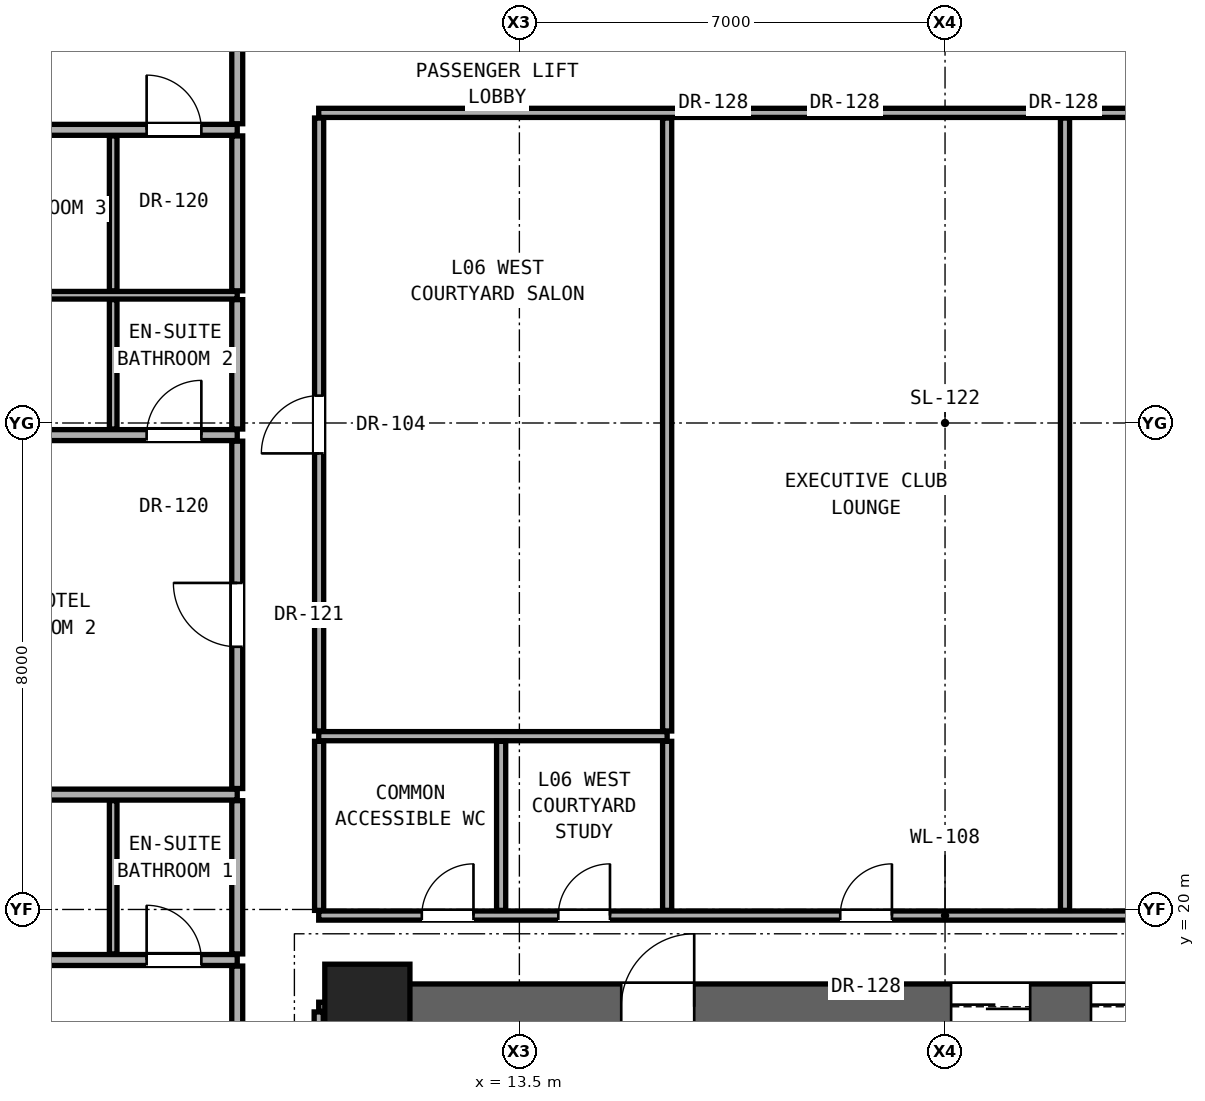
"""IFC4 building model, lengths in metres.
Left out: names, types, materials, properties, quantities, classifications, styles, units other than length and angle.
Written with IfcOpenShell. Run it as: python <this file> out.ifc"""

import sys

from ifc_helpers import new_model, si_unit, direction, frame, frame_2d, origin, origin_2d, place, context, subcontext, project, spatial, rectangle, extrude, element, fill, save


model = new_model("IFC4")
c1 = context("Model", 3, precision=1e-05, world=origin(), true_north=direction((0.0, 1.0)))
c2 = subcontext(c1, "Body", "Model", "MODEL_VIEW")
j1 = project(units=[si_unit("LENGTHUNIT", "METRE"), si_unit("PLANEANGLEUNIT", "RADIAN")], contexts=[c1])
p1 = place(None, origin())
s1 = spatial("IfcSite", under=j1, at=p1, CompositionType="ELEMENT")
p2 = place(p1, origin())
s2 = spatial("IfcBuilding", under=s1, at=p2, CompositionType="ELEMENT")
p3 = place(p2, frame((0.0, 0.0, 25.7)))
s3 = spatial("IfcBuildingStorey", under=s2, at=p3, CompositionType="ELEMENT", Elevation=25.7)
p4 = place(p3, frame((11.0, 18.4, 0.0), z_axis=(0.0, 0.0, 1.0), x_axis=(1.0, 0.0, 0.0)))
e1 = element("IfcColumn", 1, at=p4, inside=s3, PredefinedType="COLUMN", context=c2, shape_type="SweptSolid", body=[
    extrude(rectangle(XDim=1.4, YDim=1.4, at=origin_2d()), origin(), (0.0, 0.0, 1.0), 3.3),
])
p5 = place(p3, frame((11.0, 12.4, 0.0), z_axis=(0.0, 0.0, 1.0), x_axis=(0.0, 1.0, 0.0)))
e2 = element("IfcWall", 2, at=p5, inside=s3, PredefinedType="SHEAR", context=c2, shape_type="SweptSolid", body=[
    extrude(rectangle(XDim=6.0, YDim=0.75, at=frame_2d((3.0, 0.0))), origin(), (0.0, 0.0, 1.0), 3.06),
])
p6 = place(p3, frame((11.0, 18.4, 0.0), z_axis=(0.0, 0.0, 1.0), x_axis=(1.0, 0.0, 0.0)))
e3 = element("IfcWall", 3, at=p6, inside=s3, PredefinedType="SHEAR", context=c2, shape_type="SweptSolid", body=[
    extrude(rectangle(XDim=19.0, YDim=0.75, at=frame_2d((9.5, 0.0))), origin(), (0.0, 0.0, 1.0), 3.06),
])
p7 = place(p6, frame((4.175, 0.0, 0.0)))
e4 = element("IfcOpeningElement", 4, at=p7, cuts=e3, PredefinedType="OPENING", context=c2, shape_type="SweptSolid", body=[
    extrude(rectangle(XDim=1.2, YDim=2.25, at=frame_2d((0.6, 1.125))), frame((0.0, 0.385, 0.0), z_axis=(0.0, -1.0, 0.0), x_axis=(1.0, 0.0, 0.0)), (0.0, 0.0, 1.0), 0.77),
])
p8 = place(p6, frame((9.6, 0.0, 0.0)))
e5 = element("IfcOpeningElement", 5, at=p8, cuts=e3, PredefinedType="OPENING", context=c2, shape_type="SweptSolid", body=[
    extrude(rectangle(XDim=1.3, YDim=2.3, at=frame_2d((0.65, 1.15))), frame((0.0, 0.385, 0.0), z_axis=(0.0, -1.0, 0.0), x_axis=(1.0, 0.0, 0.0)), (0.0, 0.0, 1.0), 0.77),
])
p9 = place(p6, frame((11.9, 0.0, 0.0)))
e6 = element("IfcOpeningElement", 6, at=p9, cuts=e3, PredefinedType="OPENING", context=c2, shape_type="SweptSolid", body=[
    extrude(rectangle(XDim=1.3, YDim=2.3, at=frame_2d((0.65, 1.15))), frame((0.0, 0.385, 0.0), z_axis=(0.0, -1.0, 0.0), x_axis=(1.0, 0.0, 0.0)), (0.0, 0.0, 1.0), 0.77),
])
p10 = place(p6, frame((14.3, 0.0, 0.0)))
e7 = element("IfcOpeningElement", 7, at=p10, cuts=e3, PredefinedType="OPENING", context=c2, shape_type="SweptSolid", body=[
    extrude(rectangle(XDim=1.3, YDim=2.3, at=frame_2d((0.65, 1.15))), frame((0.0, 0.385, 0.0), z_axis=(0.0, -1.0, 0.0), x_axis=(1.0, 0.0, 0.0)), (0.0, 0.0, 1.0), 0.77),
])
p11 = place(p6, frame((16.6, 0.0, 0.0)))
e8 = element("IfcOpeningElement", 8, at=p11, cuts=e3, PredefinedType="OPENING", context=c2, shape_type="SweptSolid", body=[
    extrude(rectangle(XDim=1.3, YDim=2.3, at=frame_2d((0.65, 1.15))), frame((0.0, 0.385, 0.0), z_axis=(0.0, -1.0, 0.0), x_axis=(1.0, 0.0, 0.0)), (0.0, 0.0, 1.0), 0.77),
])
p12 = place(p3, frame((10.2, 18.4, 0.0), z_axis=(0.0, 0.0, 1.0), x_axis=(1.0, 0.0, 0.0)))
e9 = element("IfcWall", 9, at=p12, inside=s3, PredefinedType="PARTITIONING", context=c2, shape_type="SweptSolid", body=[
    extrude(rectangle(XDim=0.43, YDim=0.15, at=frame_2d((0.215, 0.0))), origin(), (0.0, 0.0, 1.0), 2.436),
])
p13 = place(p3, frame((-0.76, 19.169, 0.0), z_axis=(0.0, 0.0, 1.0), x_axis=(1.0, 0.0, 0.0)))
e10 = element("IfcWall", 10, at=p13, inside=s3, PredefinedType="PARTITIONING", context=c2, shape_type="SweptSolid", body=[
    extrude(rectangle(XDim=9.62, YDim=0.18, at=frame_2d((4.81, 0.0))), origin(), (0.0, 0.0, 1.0), 2.125),
])
p14 = place(p13, frame((3.685, 0.0, 0.0)))
e11 = element("IfcOpeningElement", 11, at=p14, cuts=e10, PredefinedType="OPENING", context=c2, shape_type="SweptSolid", body=[
    extrude(rectangle(XDim=0.85, YDim=2.01, at=frame_2d((0.425, 1.005))), frame((0.0, 0.1, 0.0), z_axis=(0.0, -1.0, 0.0), x_axis=(1.0, 0.0, 0.0)), (0.0, 0.0, 1.0), 0.2),
])
p15 = place(p13, frame((8.13, 0.0, 0.0)))
e12 = element("IfcOpeningElement", 12, at=p15, cuts=e10, PredefinedType="OPENING", context=c2, shape_type="SweptSolid", body=[
    extrude(rectangle(XDim=0.9, YDim=2.1, at=frame_2d((0.45, 1.05))), frame((0.0, 0.1, 0.0), z_axis=(0.0, -1.0, 0.0), x_axis=(1.0, 0.0, 0.0)), (0.0, 0.0, 1.0), 0.2),
])
p16 = place(p3, frame((10.2, 19.9, 0.0), z_axis=(0.0, 0.0, 1.0), x_axis=(1.0, 0.0, 0.0)))
e13 = element("IfcWall", 13, at=p16, inside=s3, PredefinedType="PARTITIONING", context=c2, shape_type="SweptSolid", body=[
    extrude(rectangle(XDim=20.6, YDim=0.15, at=frame_2d((10.3, 0.0))), origin(), (0.0, 0.0, 1.0), 2.104),
])
p17 = place(p16, frame((1.695, 0.0, 0.0)))
e14 = element("IfcOpeningElement", 14, at=p17, cuts=e13, PredefinedType="OPENING", context=c2, shape_type="SweptSolid", body=[
    extrude(rectangle(XDim=0.85, YDim=2.01, at=frame_2d((0.425, 1.005))), frame((0.0, 0.085, 0.0), z_axis=(0.0, -1.0, 0.0), x_axis=(1.0, 0.0, 0.0)), (0.0, 0.0, 1.0), 0.17),
])
p18 = place(p16, frame((3.94, 0.0, 0.0)))
e15 = element("IfcOpeningElement", 15, at=p18, cuts=e13, PredefinedType="OPENING", context=c2, shape_type="SweptSolid", body=[
    extrude(rectangle(XDim=0.85, YDim=2.01, at=frame_2d((0.425, 1.005))), frame((0.0, 0.085, 0.0), z_axis=(0.0, -1.0, 0.0), x_axis=(1.0, 0.0, 0.0)), (0.0, 0.0, 1.0), 0.17),
])
p19 = place(p16, frame((8.576, 0.0, 0.0)))
e16 = element("IfcOpeningElement", 16, at=p19, cuts=e13, PredefinedType="OPENING", context=c2, shape_type="SweptSolid", body=[
    extrude(rectangle(XDim=0.85, YDim=2.01, at=frame_2d((0.425, 1.005))), frame((0.0, 0.085, 0.0), z_axis=(0.0, -1.0, 0.0), x_axis=(1.0, 0.0, 0.0)), (0.0, 0.0, 1.0), 0.17),
])
p20 = place(p3, frame((-0.76, 21.889, 0.0), z_axis=(0.0, 0.0, 1.0), x_axis=(1.0, 0.0, 0.0)))
e17 = element("IfcWall", 17, at=p20, inside=s3, PredefinedType="PARTITIONING", context=c2, shape_type="SweptSolid", body=[
    extrude(rectangle(XDim=9.62, YDim=0.18, at=frame_2d((4.81, 0.0))), origin(), (0.0, 0.0, 1.0), 2.125),
])
p21 = place(p3, frame((10.2, 22.85, 0.0), z_axis=(0.0, 0.0, 1.0), x_axis=(1.0, 0.0, 0.0)))
e18 = element("IfcWall", 18, at=p21, inside=s3, PredefinedType="PARTITIONING", context=c2, shape_type="SweptSolid", body=[
    extrude(rectangle(XDim=5.73, YDim=0.15, at=frame_2d((2.865, 0.0))), origin(), (0.0, 0.0, 1.0), 2.104),
])
p22 = place(p3, frame((-0.76, 27.801, 0.0), z_axis=(0.0, 0.0, 1.0), x_axis=(1.0, 0.0, 0.0)))
e19 = element("IfcWall", 19, at=p22, inside=s3, PredefinedType="PARTITIONING", context=c2, shape_type="SweptSolid", body=[
    extrude(rectangle(XDim=9.62, YDim=0.18, at=frame_2d((4.81, 0.0))), origin(), (0.0, 0.0, 1.0), 2.125),
])
p23 = place(p22, frame((3.385, 0.0, 0.0)))
e20 = element("IfcOpeningElement", 20, at=p23, cuts=e19, PredefinedType="OPENING", context=c2, shape_type="SweptSolid", body=[
    extrude(rectangle(XDim=0.85, YDim=2.01, at=frame_2d((0.425, 1.005))), frame((0.0, 0.1, 0.0), z_axis=(0.0, -1.0, 0.0), x_axis=(1.0, 0.0, 0.0)), (0.0, 0.0, 1.0), 0.2),
])
p24 = place(p22, frame((8.13, 0.0, 0.0)))
e21 = element("IfcOpeningElement", 21, at=p24, cuts=e19, PredefinedType="OPENING", context=c2, shape_type="SweptSolid", body=[
    extrude(rectangle(XDim=0.9, YDim=2.1, at=frame_2d((0.45, 1.05))), frame((0.0, 0.1, 0.0), z_axis=(0.0, -1.0, 0.0), x_axis=(1.0, 0.0, 0.0)), (0.0, 0.0, 1.0), 0.2),
])
p25 = place(p3, frame((-0.76, 30.101, 0.0), z_axis=(0.0, 0.0, 1.0), x_axis=(1.0, 0.0, 0.0)))
e22 = element("IfcWall", 22, at=p25, inside=s3, PredefinedType="PARTITIONING", context=c2, shape_type="SweptSolid", body=[
    extrude(rectangle(XDim=9.62, YDim=0.125, at=frame_2d((4.81, 0.0))), origin(), (0.0, 0.0, 1.0), 2.125),
])
p26 = place(p3, frame((-0.76, 32.821, 0.0), z_axis=(0.0, 0.0, 1.0), x_axis=(1.0, 0.0, 0.0)))
e23 = element("IfcWall", 23, at=p26, inside=s3, PredefinedType="PARTITIONING", context=c2, shape_type="SweptSolid", body=[
    extrude(rectangle(XDim=9.62, YDim=0.18, at=frame_2d((4.81, 0.0))), origin(), (0.0, 0.0, 1.0), 2.125),
])
p27 = place(p26, frame((3.685, 0.0, 0.0)))
e24 = element("IfcOpeningElement", 24, at=p27, cuts=e23, PredefinedType="OPENING", context=c2, shape_type="SweptSolid", body=[
    extrude(rectangle(XDim=0.85, YDim=2.01, at=frame_2d((0.425, 1.005))), frame((0.0, 0.1, 0.0), z_axis=(0.0, -1.0, 0.0), x_axis=(1.0, 0.0, 0.0)), (0.0, 0.0, 1.0), 0.2),
])
p28 = place(p26, frame((8.13, 0.0, 0.0)))
e25 = element("IfcOpeningElement", 25, at=p28, cuts=e23, PredefinedType="OPENING", context=c2, shape_type="SweptSolid", body=[
    extrude(rectangle(XDim=0.9, YDim=2.1, at=frame_2d((0.45, 1.05))), frame((0.0, 0.1, 0.0), z_axis=(0.0, -1.0, 0.0), x_axis=(1.0, 0.0, 0.0)), (0.0, 0.0, 1.0), 0.2),
])
p29 = place(p3, frame((10.2, 33.1, 0.0), z_axis=(0.0, 0.0, 1.0), x_axis=(1.0, 0.0, 0.0)))
e26 = element("IfcWall", 26, at=p29, inside=s3, PredefinedType="PARTITIONING", context=c2, shape_type="SweptSolid", body=[
    extrude(rectangle(XDim=20.6, YDim=0.15, at=frame_2d((10.3, 0.0))), origin(), (0.0, 0.0, 1.0), 2.104),
])
p30 = place(p29, frame((15.991, 0.0, 0.0)))
e27 = element("IfcOpeningElement", 27, at=p30, cuts=e26, PredefinedType="OPENING", context=c2, shape_type="SweptSolid", body=[
    extrude(rectangle(XDim=0.85, YDim=2.01, at=frame_2d((0.425, 1.005))), frame((0.0, 0.085, 0.0), z_axis=(0.0, -1.0, 0.0), x_axis=(1.0, 0.0, 0.0)), (0.0, 0.0, 1.0), 0.17),
])
p31 = place(p3, frame((6.82, 19.269, 0.0), z_axis=(0.0, 0.0, 1.0), x_axis=(0.0, 1.0, 0.0)))
e28 = element("IfcWall", 28, at=p31, inside=s3, PredefinedType="PARTITIONING", context=c2, shape_type="SweptSolid", body=[
    extrude(rectangle(XDim=2.52, YDim=0.125, at=frame_2d((1.26, 0.0))), origin(), (0.0, 0.0, 1.0), 3.06),
])
p32 = place(p3, frame((6.82, 27.901, 0.0), z_axis=(0.0, 0.0, 1.0), x_axis=(0.0, 1.0, 0.0)))
e29 = element("IfcWall", 29, at=p32, inside=s3, PredefinedType="PARTITIONING", context=c2, shape_type="SweptSolid", body=[
    extrude(rectangle(XDim=2.128, YDim=0.125, at=frame_2d((1.064, 0.0))), origin(), (0.0, 0.0, 1.0), 3.06),
])
p33 = place(p3, frame((6.82, 30.174, 0.0), z_axis=(0.0, 0.0, 1.0), x_axis=(0.0, 1.0, 0.0)))
e30 = element("IfcWall", 30, at=p33, inside=s3, PredefinedType="PARTITIONING", context=c2, shape_type="SweptSolid", body=[
    extrude(rectangle(XDim=2.547, YDim=0.125, at=frame_2d((1.274, 0.0))), origin(), (0.0, 0.0, 1.0), 2.279),
])
p34 = place(p3, frame((8.86, 14.402, 0.0), z_axis=(0.0, 0.0, 1.0), x_axis=(0.0, 1.0, 0.0)))
e31 = element("IfcWall", 31, at=p34, inside=s3, PredefinedType="PARTITIONING", context=c2, shape_type="SweptSolid", body=[
    extrude(rectangle(XDim=4.667, YDim=0.18, at=frame_2d((2.333, 0.0))), origin(), (0.0, 0.0, 1.0), 2.436),
])
p35 = place(p34, frame((2.408, 0.0, 0.0)))
e32 = element("IfcOpeningElement", 32, at=p35, cuts=e31, PredefinedType="OPENING", context=c2, shape_type="SweptSolid", body=[
    extrude(rectangle(XDim=1.05, YDim=2.2, at=frame_2d((0.525, 1.1))), frame((0.0, 0.1, 0.0), z_axis=(0.0, -1.0, 0.0), x_axis=(1.0, 0.0, 0.0)), (0.0, 0.0, 1.0), 0.2),
])
p36 = place(p3, frame((8.86, 19.269, 0.0), z_axis=(0.0, 0.0, 1.0), x_axis=(0.0, 1.0, 0.0)))
e33 = element("IfcWall", 33, at=p36, inside=s3, PredefinedType="PARTITIONING", context=c2, shape_type="SweptSolid", body=[
    extrude(rectangle(XDim=2.52, YDim=0.18, at=frame_2d((1.26, 0.0))), origin(), (0.0, 0.0, 1.0), 3.06),
])
p37 = place(p3, frame((8.86, 21.989, 0.0), z_axis=(0.0, 0.0, 1.0), x_axis=(0.0, 1.0, 0.0)))
e34 = element("IfcWall", 34, at=p37, inside=s3, PredefinedType="PARTITIONING", context=c2, shape_type="SweptSolid", body=[
    extrude(rectangle(XDim=5.712, YDim=0.18, at=frame_2d((2.856, 0.0))), origin(), (0.0, 0.0, 1.0), 2.279),
])
p38 = place(p37, frame((2.331, 0.0, 0.0)))
e35 = element("IfcOpeningElement", 35, at=p38, cuts=e34, PredefinedType="OPENING", context=c2, shape_type="SweptSolid", body=[
    extrude(rectangle(XDim=1.05, YDim=2.2, at=frame_2d((0.525, 1.1))), frame((0.0, 0.1, 0.0), z_axis=(0.0, -1.0, 0.0), x_axis=(1.0, 0.0, 0.0)), (0.0, 0.0, 1.0), 0.2),
])
p39 = place(p3, frame((8.86, 27.901, 0.0), z_axis=(0.0, 0.0, 1.0), x_axis=(0.0, 1.0, 0.0)))
e36 = element("IfcWall", 36, at=p39, inside=s3, PredefinedType="PARTITIONING", context=c2, shape_type="SweptSolid", body=[
    extrude(rectangle(XDim=2.128, YDim=0.18, at=frame_2d((1.064, 0.0))), origin(), (0.0, 0.0, 1.0), 3.06),
])
p40 = place(p3, frame((8.86, 30.174, 0.0), z_axis=(0.0, 0.0, 1.0), x_axis=(0.0, 1.0, 0.0)))
e37 = element("IfcWall", 37, at=p40, inside=s3, PredefinedType="PARTITIONING", context=c2, shape_type="SweptSolid", body=[
    extrude(rectangle(XDim=2.547, YDim=0.18, at=frame_2d((1.274, 0.0))), origin(), (0.0, 0.0, 1.0), 2.279),
])
p41 = place(p3, frame((8.86, 32.921, 0.0), z_axis=(0.0, 0.0, 1.0), x_axis=(0.0, 1.0, 0.0)))
e38 = element("IfcWall", 38, at=p41, inside=s3, PredefinedType="PARTITIONING", context=c2, shape_type="SweptSolid", body=[
    extrude(rectangle(XDim=8.677, YDim=0.18, at=frame_2d((4.338, 0.0))), origin(), (0.0, 0.0, 1.0), 2.436),
])
p42 = place(p41, frame((3.813, 0.0, 0.0)))
e39 = element("IfcOpeningElement", 39, at=p42, cuts=e38, PredefinedType="OPENING", context=c2, shape_type="SweptSolid", body=[
    extrude(rectangle(XDim=1.05, YDim=2.2, at=frame_2d((0.525, 1.1))), frame((0.0, 0.1, 0.0), z_axis=(0.0, -1.0, 0.0), x_axis=(1.0, 0.0, 0.0)), (0.0, 0.0, 1.0), 0.2),
])
p43 = place(p3, frame((10.2, 12.335, 0.0), z_axis=(0.0, 0.0, 1.0), x_axis=(0.0, 1.0, 0.0)))
e40 = element("IfcWall", 40, at=p43, inside=s3, PredefinedType="PARTITIONING", context=c2, shape_type="SweptSolid", body=[
    extrude(rectangle(XDim=5.98, YDim=0.15, at=frame_2d((2.99, 0.0))), origin(), (0.0, 0.0, 1.0), 2.436),
])
p44 = place(p3, frame((10.207, 19.985, 0.0), z_axis=(0.0, 0.0, 1.0), x_axis=(0.0, 1.0, 0.0)))
e41 = element("IfcWall", 41, at=p44, inside=s3, PredefinedType="PARTITIONING", context=c2, shape_type="SweptSolid", body=[
    extrude(rectangle(XDim=2.78, YDim=0.15, at=frame_2d((1.39, 0.0))), origin(), (0.0, 0.0, 1.0), 3.06),
])
p45 = place(p3, frame((10.207, 22.935, 0.0), z_axis=(0.0, 0.0, 1.0), x_axis=(0.0, 1.0, 0.0)))
e42 = element("IfcWall", 42, at=p45, inside=s3, PredefinedType="PARTITIONING", context=c2, shape_type="SweptSolid", body=[
    extrude(rectangle(XDim=10.08, YDim=0.15, at=frame_2d((5.04, 0.0))), origin(), (0.0, 0.0, 1.0), 2.279),
])
p46 = place(p45, frame((4.565, 0.0, 0.0)))
e43 = element("IfcOpeningElement", 43, at=p46, cuts=e42, PredefinedType="OPENING", context=c2, shape_type="SweptSolid", body=[
    extrude(rectangle(XDim=0.95, YDim=2.15, at=frame_2d((0.475, 1.075))), frame((0.0, 0.085, 0.0), z_axis=(0.0, -1.0, 0.0), x_axis=(1.0, 0.0, 0.0)), (0.0, 0.0, 1.0), 0.17),
])
p47 = place(p3, frame((13.2, 19.985, 0.0), z_axis=(0.0, 0.0, 1.0), x_axis=(0.0, 1.0, 0.0)))
e44 = element("IfcWall", 44, at=p47, inside=s3, PredefinedType="PARTITIONING", context=c2, shape_type="SweptSolid", body=[
    extrude(rectangle(XDim=2.78, YDim=0.15, at=frame_2d((1.39, 0.0))), origin(), (0.0, 0.0, 1.0), 3.06),
])
p48 = place(p3, frame((15.93, 19.985, 0.0), z_axis=(0.0, 0.0, 1.0), x_axis=(0.0, 1.0, 0.0)))
e45 = element("IfcWall", 45, at=p48, inside=s3, PredefinedType="PARTITIONING", context=c2, shape_type="SweptSolid", body=[
    extrude(rectangle(XDim=2.78, YDim=0.15, at=frame_2d((1.39, 0.0))), origin(), (0.0, 0.0, 1.0), 2.589),
])
p49 = place(p3, frame((15.93, 22.935, 0.0), z_axis=(0.0, 0.0, 1.0), x_axis=(0.0, 1.0, 0.0)))
e46 = element("IfcWall", 46, at=p49, inside=s3, PredefinedType="PARTITIONING", context=c2, shape_type="SweptSolid", body=[
    extrude(rectangle(XDim=10.08, YDim=0.15, at=frame_2d((5.04, 0.0))), origin(), (0.0, 0.0, 1.0), 2.104),
])
p50 = place(p3, frame((22.473, 19.985, 0.0), z_axis=(0.0, 0.0, 1.0), x_axis=(0.0, 1.0, 0.0)))
e47 = element("IfcWall", 47, at=p50, inside=s3, PredefinedType="PARTITIONING", context=c2, shape_type="SweptSolid", body=[
    extrude(rectangle(XDim=13.03, YDim=0.15, at=frame_2d((6.515, 0.0))), origin(), (0.0, 0.0, 1.0), 2.104),
])
p51 = place(p7, origin())
e48 = element("IfcDoor", 48, at=p51, inside=s3, OperationType="SINGLE_SWING_RIGHT", PredefinedType="DOOR", context=c2, shape_type="SweptSolid", body=[
    extrude(rectangle(XDim=1.2, YDim=2.25, at=frame_2d((0.6, 1.125))), frame((0.0, 0.025, 0.0), z_axis=(0.0, -1.0, 0.0), x_axis=(1.0, 0.0, 0.0)), (0.0, 0.0, 1.0), 0.05),
])
fill(e4, e48)
p52 = place(p17, origin())
e49 = element("IfcDoor", 49, at=p52, inside=s3, OperationType="SINGLE_SWING_RIGHT", PredefinedType="DOOR", context=c2, shape_type="SweptSolid", body=[
    extrude(rectangle(XDim=0.85, YDim=2.01, at=frame_2d((0.425, 1.005))), frame((0.0, 0.025, 0.0), z_axis=(0.0, -1.0, 0.0), x_axis=(1.0, 0.0, 0.0)), (0.0, 0.0, 1.0), 0.05),
])
fill(e14, e49)
p53 = place(p15, origin())
e50 = element("IfcDoor", 50, at=p53, inside=s3, OperationType="SINGLE_SWING_LEFT", PredefinedType="DOOR", context=c2, shape_type="SweptSolid", body=[
    extrude(rectangle(XDim=0.9, YDim=2.1, at=frame_2d((0.45, 1.05))), frame((0.0, 0.025, 0.0), z_axis=(0.0, -1.0, 0.0), x_axis=(1.0, 0.0, 0.0)), (0.0, 0.0, 1.0), 0.05),
])
fill(e12, e50)
p54 = place(p38, origin())
e51 = element("IfcDoor", 51, at=p54, inside=s3, OperationType="SINGLE_SWING_RIGHT", PredefinedType="DOOR", context=c2, shape_type="SweptSolid", body=[
    extrude(rectangle(XDim=1.05, YDim=2.2, at=frame_2d((0.525, 1.1))), frame((0.0, 0.025, 0.0), z_axis=(0.0, -1.0, 0.0), x_axis=(1.0, 0.0, 0.0)), (0.0, 0.0, 1.0), 0.05),
])
fill(e35, e51)
p55 = place(p24, origin())
e52 = element("IfcDoor", 52, at=p55, inside=s3, OperationType="SINGLE_SWING_RIGHT", PredefinedType="DOOR", context=c2, shape_type="SweptSolid", body=[
    extrude(rectangle(XDim=0.9, YDim=2.1, at=frame_2d((0.45, 1.05))), frame((0.0, 0.025, 0.0), z_axis=(0.0, -1.0, 0.0), x_axis=(1.0, 0.0, 0.0)), (0.0, 0.0, 1.0), 0.05),
])
fill(e21, e52)
p56 = place(p28, origin())
e53 = element("IfcDoor", 53, at=p56, inside=s3, OperationType="SINGLE_SWING_LEFT", PredefinedType="DOOR", context=c2, shape_type="SweptSolid", body=[
    extrude(rectangle(XDim=0.9, YDim=2.1, at=frame_2d((0.45, 1.05))), frame((0.0, 0.025, 0.0), z_axis=(0.0, -1.0, 0.0), x_axis=(1.0, 0.0, 0.0)), (0.0, 0.0, 1.0), 0.05),
])
fill(e25, e53)
p57 = place(p18, origin())
e54 = element("IfcDoor", 54, at=p57, inside=s3, OperationType="SINGLE_SWING_RIGHT", PredefinedType="DOOR", context=c2, shape_type="SweptSolid", body=[
    extrude(rectangle(XDim=0.85, YDim=2.01, at=frame_2d((0.425, 1.005))), frame((0.0, 0.025, 0.0), z_axis=(0.0, -1.0, 0.0), x_axis=(1.0, 0.0, 0.0)), (0.0, 0.0, 1.0), 0.05),
])
fill(e15, e54)
p58 = place(p46, origin())
e55 = element("IfcDoor", 55, at=p58, inside=s3, OperationType="SINGLE_SWING_LEFT", PredefinedType="DOOR", context=c2, shape_type="SweptSolid", body=[
    extrude(rectangle(XDim=0.95, YDim=2.15, at=frame_2d((0.475, 1.075))), frame((0.0, 0.025, 0.0), z_axis=(0.0, -1.0, 0.0), x_axis=(1.0, 0.0, 0.0)), (0.0, 0.0, 1.0), 0.05),
])
fill(e43, e55)
p59 = place(p19, origin())
e56 = element("IfcDoor", 56, at=p59, inside=s3, OperationType="SINGLE_SWING_RIGHT", PredefinedType="DOOR", context=c2, shape_type="SweptSolid", body=[
    extrude(rectangle(XDim=0.85, YDim=2.01, at=frame_2d((0.425, 1.005))), frame((0.0, 0.025, 0.0), z_axis=(0.0, -1.0, 0.0), x_axis=(1.0, 0.0, 0.0)), (0.0, 0.0, 1.0), 0.05),
])
fill(e16, e56)
p60 = place(p8, origin())
e57 = element("IfcDoor", 57, at=p60, inside=s3, OperationType="DOUBLE_DOOR_SLIDING", PredefinedType="DOOR", context=c2, shape_type="SweptSolid", body=[
    extrude(rectangle(XDim=1.3, YDim=2.3, at=frame_2d((0.65, 1.15))), frame((0.0, 0.025, 0.0), z_axis=(0.0, -1.0, 0.0), x_axis=(1.0, 0.0, 0.0)), (0.0, 0.0, 1.0), 0.05),
])
fill(e5, e57)
p61 = place(p9, origin())
e58 = element("IfcDoor", 58, at=p61, inside=s3, OperationType="DOUBLE_DOOR_SLIDING", PredefinedType="DOOR", context=c2, shape_type="SweptSolid", body=[
    extrude(rectangle(XDim=1.3, YDim=2.3, at=frame_2d((0.65, 1.15))), frame((0.0, 0.025, 0.0), z_axis=(0.0, -1.0, 0.0), x_axis=(1.0, 0.0, 0.0)), (0.0, 0.0, 1.0), 0.05),
])
fill(e6, e58)
save(model, sys.argv[1])
